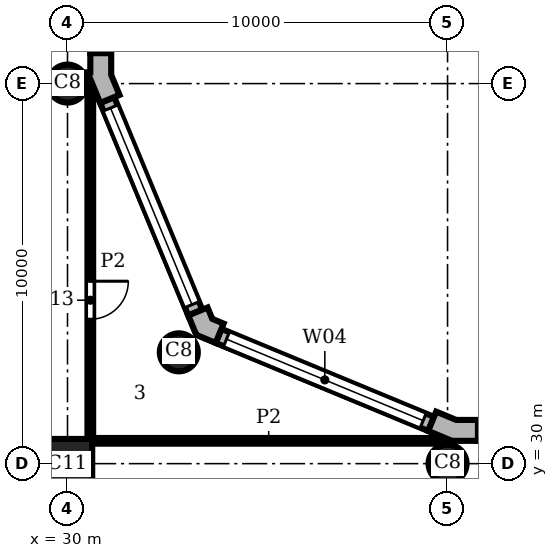
"""IFC4 building model, lengths in metres.
Left out: names, types, materials, properties, quantities, classifications, styles, units other than length and angle.
Written with IfcOpenShell. Run it as: python <this file> out.ifc"""

import sys

from ifc_helpers import new_model, si_unit, direction, frame, frame_2d, origin, origin_2d, place, context, subcontext, project, spatial, polyline, rectangle, circle, outline, extrude, element, fill, save


model = new_model("IFC4")
c1 = context("Model", 3, precision=1e-05, world=origin(), true_north=direction((0.0, 1.0)))
c2 = subcontext(c1, "Body", "Model", "MODEL_VIEW")
j1 = project(units=[si_unit("LENGTHUNIT", "METRE"), si_unit("PLANEANGLEUNIT", "RADIAN")], contexts=[c1])
p1 = place(None, origin())
s1 = spatial("IfcSite", under=j1, at=p1, CompositionType="ELEMENT")
p2 = place(p1, origin())
s2 = spatial("IfcBuilding", under=s1, at=p2, CompositionType="ELEMENT")
p3 = place(p2, frame((0.0, 0.0, 190.2)))
s3 = spatial("IfcBuildingStorey", under=s2, at=p3, CompositionType="ELEMENT", Elevation=190.2)
for number, where, z_axis, x_axis in (
    (1, (40.0, 30.0, 0.0), (0.0, 0.0, 1.0), (1.0, 0.0, 0.0)),
    (2, (32.929, 32.929, 0.0), (0.0, 0.0, 1.0), (1.0, 0.0, 0.0)),
    (3, (30.0, 40.0, 0.0), (0.0, 0.0, 1.0), (1.0, 0.0, 0.0)),
):
    element("IfcColumn", number, at=place(p3, frame(where, z_axis=z_axis, x_axis=x_axis)), inside=s3, PredefinedType="COLUMN", context=c2, shape_type="SweptSolid", body=[
        extrude(circle(Radius=0.5, at=origin_2d()), origin(), (0.0, 0.0, 1.0), 3.9),
    ])
p4 = place(p3, frame((30.0, 30.0, 0.0), z_axis=(0.0, 0.0, 1.0), x_axis=(1.0, 0.0, 0.0)))
e4 = element("IfcColumn", 4, at=p4, inside=s3, PredefinedType="COLUMN", context=c2, shape_type="SweptSolid", body=[
    extrude(rectangle(XDim=1.3, YDim=1.3, at=origin_2d()), origin(), (0.0, 0.0, 1.0), 3.9),
])
p5 = place(p3, origin())
e5 = element("IfcWall", 5, at=p5, inside=s3, PredefinedType="SOLIDWALL", context=c2, shape_type="SweptSolid", body=[
    extrude(outline(polyline([(40.8, 31.0), (40.8, 31.15), (40.229, 31.15), (39.701, 31.369), (39.644, 31.23), (39.49, 30.861), (40.119, 30.6), (40.8, 30.6), (40.8, 31.0)])), origin(), (0.0, 0.0, 1.0), 3.9),
])
e6 = element("IfcWall", 6, at=p5, inside=s3, PredefinedType="SOLIDWALL", context=c2, shape_type="SweptSolid", body=[
    extrude(outline(polyline([(34.051, 33.547), (34.108, 33.685), (33.809, 33.809), (33.685, 34.108), (33.547, 34.051), (33.177, 33.898), (33.388, 33.388), (33.898, 33.177), (34.051, 33.547)])), origin(), (0.0, 0.0, 1.0), 3.9),
])
e7 = element("IfcWall", 7, at=p5, inside=s3, PredefinedType="SOLIDWALL", context=c2, shape_type="SweptSolid", body=[
    extrude(outline(polyline([(30.62, 39.995), (30.62, 40.071), (30.861, 39.49), (31.23, 39.644), (31.369, 39.701), (31.15, 40.229), (31.15, 40.8), (31.0, 40.8), (30.6, 40.8), (30.6, 40.295), (30.5, 40.295), (30.5, 39.995), (30.62, 39.995)])), origin(), (0.0, 0.0, 1.0), 3.9),
])
p6 = place(p3, frame((59.2, 30.8, 0.0), z_axis=(0.0, 0.0, 1.0), x_axis=(-1.0, 0.0, 0.0)))
e8 = element("IfcWall", 8, at=p6, inside=s3, PredefinedType="SOLIDWALL", context=c2, shape_type="SweptSolid", body=[
    extrude(rectangle(XDim=18.4, YDim=0.4, at=frame_2d((9.2, 0.0))), origin(), (0.0, 0.0, 1.0), 3.9),
])
p7 = place(p6, frame((0.2, 0.0, 0.9)))
e9 = element("IfcOpeningElement", 9, at=p7, cuts=e8, PredefinedType="OPENING", context=c2, shape_type="SweptSolid", body=[
    extrude(rectangle(XDim=8.0, YDim=2.35, at=frame_2d((4.0, 1.175))), frame((0.0, 0.21, 0.0), z_axis=(0.0, -1.0, 0.0), x_axis=(1.0, 0.0, 0.0)), (0.0, 0.0, 1.0), 0.42),
])
p8 = place(p6, frame((10.2, 0.0, 0.9)))
e10 = element("IfcOpeningElement", 10, at=p8, cuts=e8, PredefinedType="OPENING", context=c2, shape_type="SweptSolid", body=[
    extrude(rectangle(XDim=8.0, YDim=2.35, at=frame_2d((4.0, 1.175))), frame((0.0, 0.21, 0.0), z_axis=(0.0, -1.0, 0.0), x_axis=(1.0, 0.0, 0.0)), (0.0, 0.0, 1.0), 0.42),
])
p9 = place(p3, frame((39.567, 31.045, 0.0), z_axis=(0.0, 0.0, 1.0), x_axis=(-0.923891000409, 0.382655745237, 0.0)))
e11 = element("IfcWall", 11, at=p9, inside=s3, PredefinedType="SOLIDWALL", context=c2, shape_type="SweptSolid", body=[
    extrude(rectangle(XDim=6.053, YDim=0.4, at=frame_2d((3.027, 0.0))), origin(), (0.0, 0.0, 1.0), 3.9),
])
p10 = place(p9, frame((0.227, 0.0, 0.9)))
e12 = element("IfcOpeningElement", 12, at=p10, cuts=e11, PredefinedType="OPENING", context=c2, shape_type="SweptSolid", body=[
    extrude(rectangle(XDim=5.6, YDim=2.35, at=frame_2d((2.8, 1.175))), frame((0.0, 0.21, 0.0), z_axis=(0.0, -1.0, 0.0), x_axis=(1.0, 0.0, 0.0)), (0.0, 0.0, 1.0), 0.42),
])
p11 = place(p3, frame((33.362, 33.974, 0.0), z_axis=(0.0, 0.0, 1.0), x_axis=(-0.382655745237, 0.923891000409, 0.0)))
e13 = element("IfcWall", 13, at=p11, inside=s3, PredefinedType="SOLIDWALL", context=c2, shape_type="SweptSolid", body=[
    extrude(rectangle(XDim=6.053, YDim=0.4, at=frame_2d((3.027, 0.0))), origin(), (0.0, 0.0, 1.0), 3.9),
])
p12 = place(p11, frame((0.227, 0.0, 0.9)))
e14 = element("IfcOpeningElement", 14, at=p12, cuts=e13, PredefinedType="OPENING", context=c2, shape_type="SweptSolid", body=[
    extrude(rectangle(XDim=5.6, YDim=2.35, at=frame_2d((2.8, 1.175))), frame((0.0, 0.21, 0.0), z_axis=(0.0, -1.0, 0.0), x_axis=(1.0, 0.0, 0.0)), (0.0, 0.0, 1.0), 0.42),
])
p13 = place(p3, frame((30.8, 40.8, 0.0), z_axis=(0.0, 0.0, 1.0), x_axis=(0.0, 1.0, 0.0)))
e15 = element("IfcWall", 15, at=p13, inside=s3, PredefinedType="SOLIDWALL", context=c2, shape_type="SweptSolid", body=[
    extrude(rectangle(XDim=18.4, YDim=0.4, at=frame_2d((9.2, 0.0))), origin(), (0.0, 0.0, 1.0), 3.9),
])
p14 = place(p13, frame((0.2, 0.0, 0.9)))
e16 = element("IfcOpeningElement", 16, at=p14, cuts=e15, PredefinedType="OPENING", context=c2, shape_type="SweptSolid", body=[
    extrude(rectangle(XDim=8.0, YDim=2.35, at=frame_2d((4.0, 1.175))), frame((0.0, 0.21, 0.0), z_axis=(0.0, -1.0, 0.0), x_axis=(1.0, 0.0, 0.0)), (0.0, 0.0, 1.0), 0.42),
])
p15 = place(p13, frame((10.2, 0.0, 0.9)))
e17 = element("IfcOpeningElement", 17, at=p15, cuts=e15, PredefinedType="OPENING", context=c2, shape_type="SweptSolid", body=[
    extrude(rectangle(XDim=8.0, YDim=2.35, at=frame_2d((4.0, 1.175))), frame((0.0, 0.21, 0.0), z_axis=(0.0, -1.0, 0.0), x_axis=(1.0, 0.0, 0.0)), (0.0, 0.0, 1.0), 0.42),
])
p16 = place(p3, frame((30.6, 30.65, 0.0), z_axis=(0.0, 0.0, 1.0), x_axis=(0.0, 1.0, 0.0)))
e18 = element("IfcWall", 18, at=p16, inside=s3, PredefinedType="PARTITIONING", context=c2, shape_type="SweptSolid", body=[
    extrude(rectangle(XDim=9.288, YDim=0.15, at=frame_2d((4.644, 0.0))), origin(), (0.0, 0.0, 1.0), 3.58),
])
p17 = place(p16, frame((3.15, 0.0, 0.0)))
e19 = element("IfcOpeningElement", 19, at=p17, cuts=e18, PredefinedType="OPENING", context=c2, shape_type="SweptSolid", body=[
    extrude(rectangle(XDim=1.0, YDim=2.1, at=frame_2d((0.5, 1.05))), frame((0.0, 0.085, 0.0), z_axis=(0.0, -1.0, 0.0), x_axis=(1.0, 0.0, 0.0)), (0.0, 0.0, 1.0), 0.17),
])
p18 = place(p3, frame((30.65, 30.6, 0.0), z_axis=(0.0, 0.0, 1.0), x_axis=(1.0, 0.0, 0.0)))
e20 = element("IfcWall", 20, at=p18, inside=s3, PredefinedType="PARTITIONING", context=c2, shape_type="SweptSolid", body=[
    extrude(rectangle(XDim=9.288, YDim=0.15, at=frame_2d((4.644, 0.0))), origin(), (0.0, 0.0, 1.0), 3.58),
])
p19 = place(p10, origin())
e21 = element("IfcWindow", 21, at=p19, inside=s3, PartitioningType="SINGLE_PANEL", PredefinedType="WINDOW", context=c2, shape_type="SweptSolid", body=[
    extrude(rectangle(XDim=5.6, YDim=2.35, at=frame_2d((2.8, 1.175))), frame((0.0, 0.16, 0.0), z_axis=(0.0, -1.0, 0.0), x_axis=(1.0, 0.0, 0.0)), (0.0, 0.0, 1.0), 0.06),
])
fill(e12, e21)
p20 = place(p12, origin())
e22 = element("IfcWindow", 22, at=p20, inside=s3, PartitioningType="SINGLE_PANEL", PredefinedType="WINDOW", context=c2, shape_type="SweptSolid", body=[
    extrude(rectangle(XDim=5.6, YDim=2.35, at=frame_2d((2.8, 1.175))), frame((0.0, 0.16, 0.0), z_axis=(0.0, -1.0, 0.0), x_axis=(1.0, 0.0, 0.0)), (0.0, 0.0, 1.0), 0.06),
])
fill(e14, e22)
p21 = place(p17, frame((1.0, 0.0, 0.0), z_axis=(0.0, 0.0, 1.0), x_axis=(-1.0, 0.0, 0.0)))
e23 = element("IfcDoor", 23, at=p21, inside=s3, OperationType="SINGLE_SWING_LEFT", PredefinedType="DOOR", context=c2, shape_type="SweptSolid", body=[
    extrude(rectangle(XDim=1.0, YDim=2.1, at=frame_2d((0.5, 1.05))), frame((0.0, 0.025, 0.0), z_axis=(0.0, -1.0, 0.0), x_axis=(1.0, 0.0, 0.0)), (0.0, 0.0, 1.0), 0.05),
])
fill(e19, e23)
save(model, sys.argv[1])
